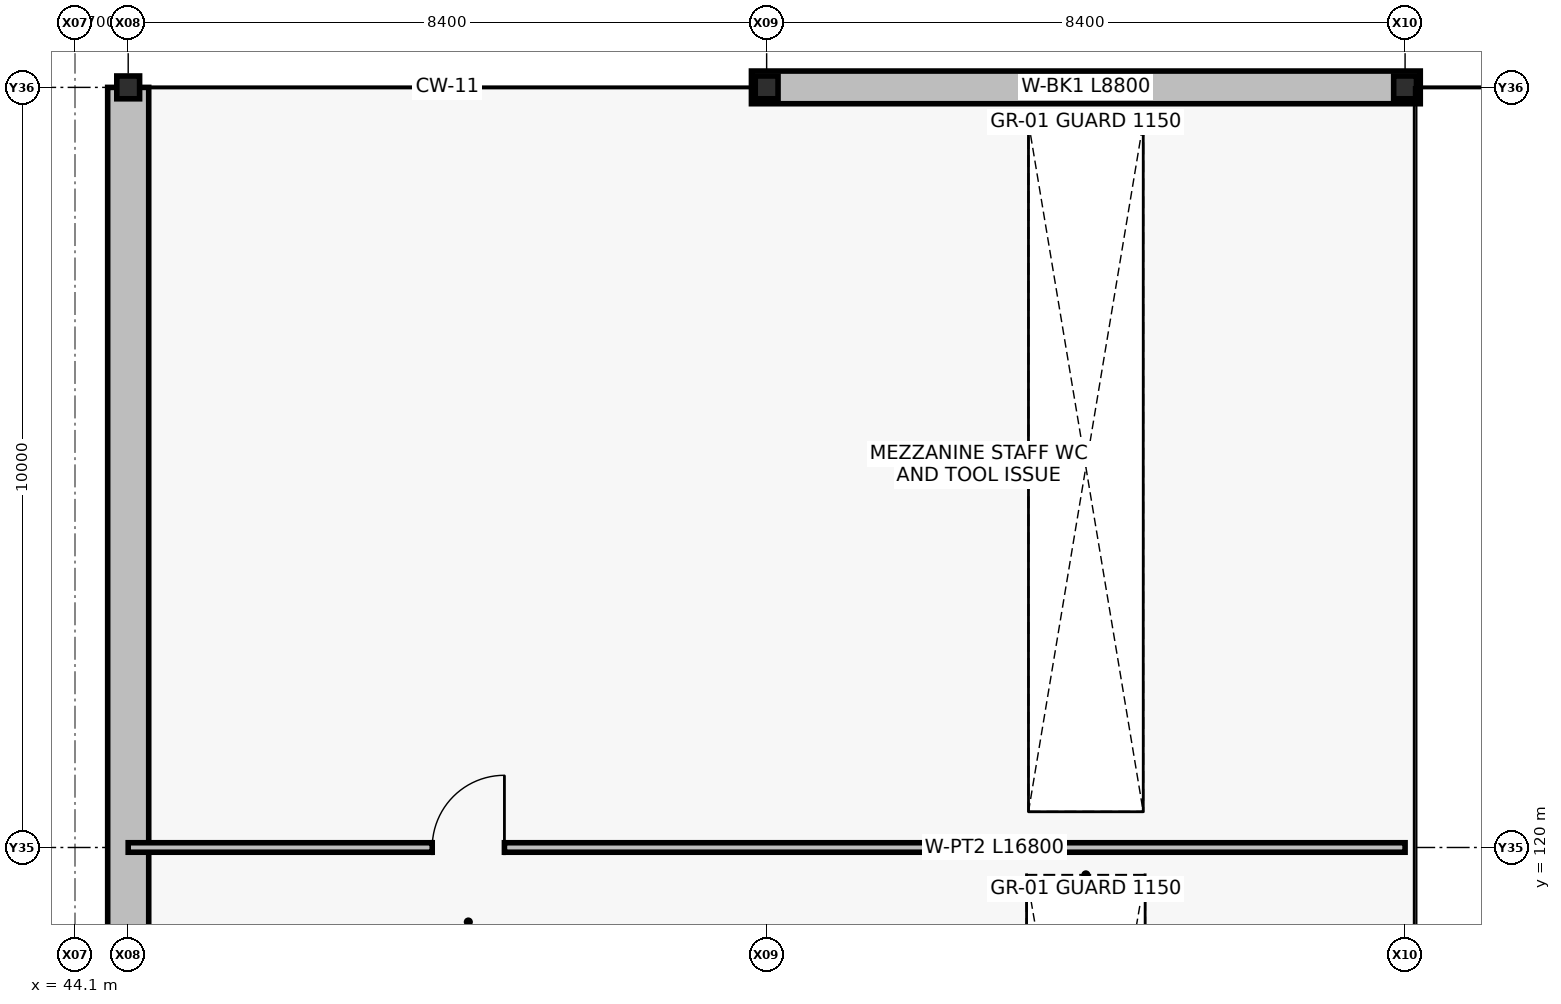
"""IFC4 building model, lengths in metres.
Left out: names, types, materials, properties, quantities, classifications, styles, units other than length and angle.
Written with IfcOpenShell. Run it as: python <this file> out.ifc"""

import sys

from ifc_helpers import new_model, si_unit, direction, frame, frame_2d, origin, origin_2d, place, context, subcontext, project, spatial, rectangle, i_section, extrude, element, fill, save


model = new_model("IFC4")
c1 = context("Model", 3, precision=1e-05, world=origin(), true_north=direction((0.0, 1.0)))
c2 = subcontext(c1, "Body", "Model", "MODEL_VIEW")
j1 = project(units=[si_unit("LENGTHUNIT", "METRE"), si_unit("PLANEANGLEUNIT", "RADIAN")], contexts=[c1])
p1 = place(None, origin())
s1 = spatial("IfcSite", under=j1, at=p1, CompositionType="ELEMENT")
p2 = place(p1, origin())
s2 = spatial("IfcBuilding", under=s1, at=p2, CompositionType="ELEMENT")
p3 = place(p2, frame((0.0, 0.0, 6.0)))
s3 = spatial("IfcBuildingStorey", under=s2, at=p3, CompositionType="ELEMENT", Elevation=6.0)
for number, where, z_axis, x_axis in (
    (1, (44.8, 130.0, 0.0), (0.0, 0.0, 1.0), (1.0, 0.0, 0.0)),
    (2, (53.2, 130.0, 0.0), (0.0, 0.0, 1.0), (1.0, 0.0, 0.0)),
    (3, (61.6, 130.0, 0.0), (0.0, 0.0, 1.0), (1.0, 0.0, 0.0)),
):
    element("IfcColumn", number, at=place(p3, frame(where, z_axis=z_axis, x_axis=x_axis)), inside=s3, PredefinedType="COLUMN", context=c2, shape_type="SweptSolid", body=[
        extrude(i_section(OverallWidth=0.3, OverallDepth=0.3, WebThickness=0.01, FlangeThickness=0.015, at=origin_2d()), origin(), (0.0, 0.0, 1.0), 4.2),
    ])
p4 = place(p3, frame((44.8, 100.0, 0.0), z_axis=(0.0, 0.0, 1.0), x_axis=(0.0, 1.0, 0.0)))
e4 = element("IfcWall", 4, at=p4, inside=s3, PredefinedType="SOLIDWALL", context=c2, shape_type="SweptSolid", body=[
    extrude(rectangle(XDim=30.0, YDim=0.54, at=frame_2d((15.0, 0.0))), origin(), (0.0, 0.0, 1.0), 3.6),
])
p5 = place(p3, frame((53.0, 130.0, 0.0), z_axis=(0.0, 0.0, 1.0), x_axis=(1.0, 0.0, 0.0)))
e5 = element("IfcWall", 5, at=p5, inside=s3, PredefinedType="SOLIDWALL", context=c2, shape_type="SweptSolid", body=[
    extrude(rectangle(XDim=8.8, YDim=0.43, at=frame_2d((4.4, 0.0))), origin(), (0.0, 0.0, 1.0), 3.6),
])
p6 = place(p3, frame((44.8, 120.0, 0.0), z_axis=(0.0, 0.0, 1.0), x_axis=(1.0, 0.0, 0.0)))
e6 = element("IfcWall", 6, at=p6, inside=s3, PredefinedType="PARTITIONING", context=c2, shape_type="SweptSolid", body=[
    extrude(rectangle(XDim=16.8, YDim=0.125, at=frame_2d((8.4, 0.0))), origin(), (0.0, 0.0, 1.0), 3.4),
])
p7 = place(p6, frame((4.0, 0.0, 0.0)))
e7 = element("IfcOpeningElement", 7, at=p7, cuts=e6, PredefinedType="OPENING", context=c2, shape_type="SweptSolid", body=[
    extrude(rectangle(XDim=0.95, YDim=2.1, at=frame_2d((0.475, 1.05))), frame((0.0, 0.072, 0.0), z_axis=(0.0, -1.0, 0.0), x_axis=(1.0, 0.0, 0.0)), (0.0, 0.0, 1.0), 0.145),
])
p8 = place(p7, origin())
e8 = element("IfcDoor", 8, at=p8, inside=s3, OperationType="SINGLE_SWING_RIGHT", PredefinedType="DOOR", context=c2, shape_type="SweptSolid", body=[
    extrude(rectangle(XDim=0.95, YDim=2.1, at=frame_2d((0.475, 1.05))), frame((0.0, 0.025, 0.0), z_axis=(0.0, -1.0, 0.0), x_axis=(1.0, 0.0, 0.0)), (0.0, 0.0, 1.0), 0.05),
])
fill(e7, e8)
save(model, sys.argv[1])
